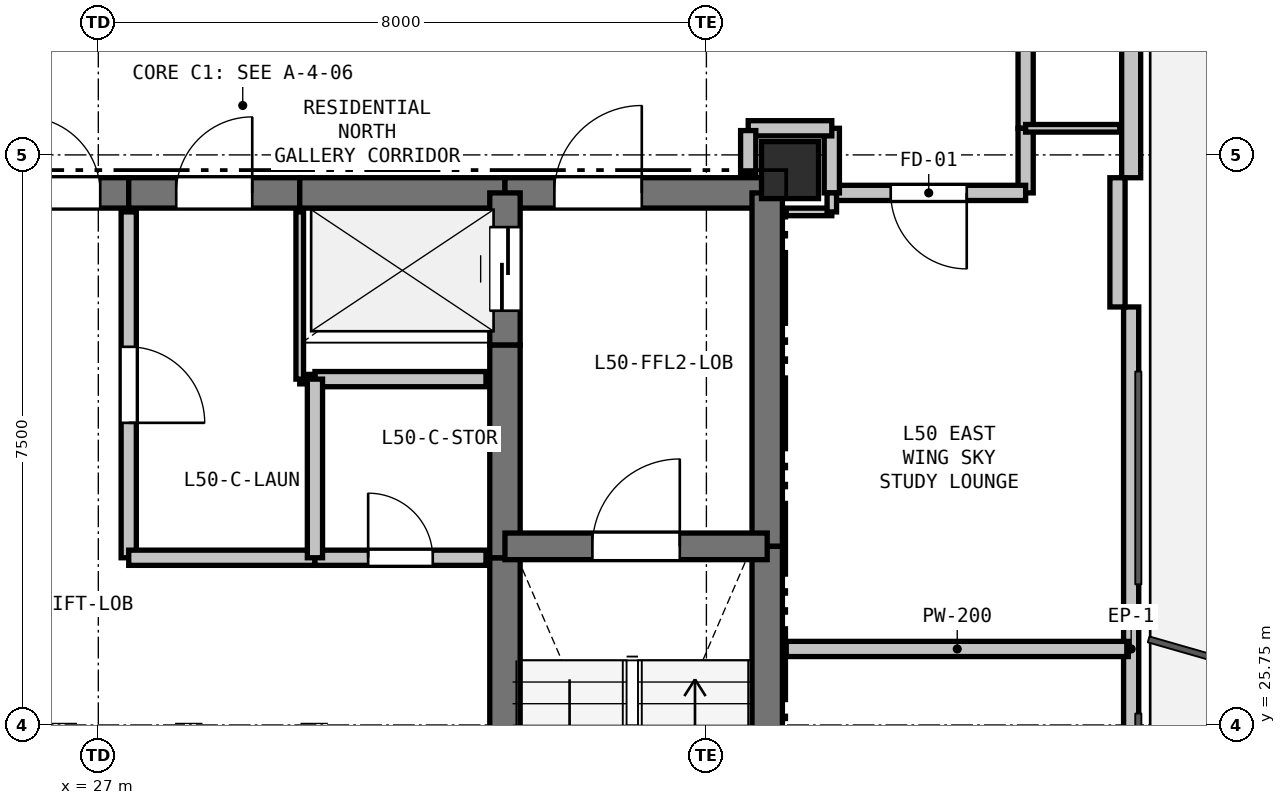
"""IFC4 building model, lengths in metres.
Left out: names, types, materials, properties, quantities, classifications, styles, units other than length and angle.
Written with IfcOpenShell. Run it as: python <this file> out.ifc"""

import sys

from ifc_helpers import new_model, si_unit, direction, frame, frame_2d, origin, origin_2d, place, context, subcontext, project, spatial, rectangle, extrude, element, fill, save


model = new_model("IFC4")
c1 = context("Model", 3, precision=1e-05, world=origin(), true_north=direction((0.0, 1.0)))
c2 = subcontext(c1, "Body", "Model", "MODEL_VIEW")
j1 = project(units=[si_unit("LENGTHUNIT", "METRE"), si_unit("PLANEANGLEUNIT", "RADIAN")], contexts=[c1])
p1 = place(None, origin())
s1 = spatial("IfcSite", under=j1, at=p1, CompositionType="ELEMENT")
p2 = place(p1, origin())
s2 = spatial("IfcBuilding", under=s1, at=p2, CompositionType="ELEMENT")
p3 = place(p2, frame((0.0, 0.0, 182.1)))
s3 = spatial("IfcBuildingStorey", under=s2, at=p3, CompositionType="ELEMENT", Elevation=182.1)
p4 = place(p3, frame((36.1, 33.05, 0.0), z_axis=(0.0, 0.0, 1.0), x_axis=(1.0, 0.0, 0.0)))
e1 = element("IfcColumn", 1, at=p4, inside=s3, PredefinedType="COLUMN", context=c2, shape_type="SweptSolid", body=[
    extrude(rectangle(XDim=0.75, YDim=0.75, at=origin_2d()), origin(), (0.0, 0.0, 1.0), 3.3),
])
p5 = place(p3, frame((19.309, 34.536, 0.0), z_axis=(0.0, 0.0, 1.0), x_axis=(0.866020680503, 0.500008180874, 0.0)))
e2 = element("IfcWall", 2, at=p5, inside=s3, PredefinedType="PARAPET", context=c2, shape_type="SweptSolid", body=[
    extrude(rectangle(XDim=8.999, YDim=0.2, at=frame_2d((4.5, 0.0))), origin(), (0.0, 0.0, 1.0), 0.2),
])
p6 = place(p3, frame((40.588, 42.648, 0.0), z_axis=(0.0, 0.0, 1.0), x_axis=(0.0, -1.0, 0.0)))
e3 = element("IfcWall", 3, at=p6, inside=s3, PredefinedType="SOLIDWALL", context=c2, shape_type="SweptSolid", body=[
    extrude(rectangle(XDim=9.699, YDim=0.25, at=frame_2d((4.85, 0.0))), origin(), (0.0, 0.0, 1.0), 2.69),
])
p7 = place(p6, frame((1.73, 0.0, 0.0)))
e4 = element("IfcOpeningElement", 4, at=p7, cuts=e3, PredefinedType="OPENING", context=c2, shape_type="SweptSolid", body=[
    extrude(rectangle(XDim=1.0, YDim=2.1, at=frame_2d((0.5, 1.05))), frame((0.0, 0.135, 0.0), z_axis=(0.0, -1.0, 0.0), x_axis=(1.0, 0.0, 0.0)), (0.0, 0.0, 1.0), 0.27),
])
p8 = place(p3, frame((40.588, 31.25, 0.0), z_axis=(0.0, 0.0, 1.0), x_axis=(0.0, -1.0, 0.0)))
e5 = element("IfcWall", 5, at=p8, inside=s3, PredefinedType="PARAPET", context=c2, shape_type="SweptSolid", body=[
    extrude(rectangle(XDim=8.999, YDim=0.2, at=frame_2d((4.5, 0.0))), origin(), (0.0, 0.0, 1.0), 0.2),
])
p9 = place(p3, frame((40.408, 32.949, 0.0), z_axis=(0.0, 0.0, 1.0), x_axis=(0.0, -1.0, 0.0)))
e6 = element("IfcWall", 6, at=p9, inside=s3, PredefinedType="PARAPET", context=c2, shape_type="SweptSolid", body=[
    extrude(rectangle(XDim=1.7, YDim=0.2, at=frame_2d((0.85, 0.0))), origin(), (0.0, 0.0, 1.0), 2.69),
])
p10 = place(p3, frame((25.65, 32.75, 0.0), z_axis=(0.0, 0.0, 1.0), x_axis=(1.0, 0.0, 0.0)))
e7 = element("IfcWall", 7, at=p10, inside=s3, PredefinedType="SHEAR", context=c2, shape_type="SweptSolid", body=[
    extrude(rectangle(XDim=1.75, YDim=0.4, at=frame_2d((0.875, 0.0))), origin(), (0.0, 0.0, 1.0), 3.07),
])
p11 = place(p10, frame((0.375, 0.0, 0.0)))
e8 = element("IfcOpeningElement", 8, at=p11, cuts=e7, PredefinedType="OPENING", context=c2, shape_type="SweptSolid", body=[
    extrude(rectangle(XDim=1.0, YDim=2.15, at=frame_2d((0.5, 1.075))), frame((0.0, 0.21, 0.0), z_axis=(0.0, -1.0, 0.0), x_axis=(1.0, 0.0, 0.0)), (0.0, 0.0, 1.0), 0.42),
])
p12 = place(p3, frame((27.4, 32.75, 0.0), z_axis=(0.0, 0.0, 1.0), x_axis=(1.0, 0.0, 0.0)))
e9 = element("IfcWall", 9, at=p12, inside=s3, PredefinedType="SHEAR", context=c2, shape_type="SweptSolid", body=[
    extrude(rectangle(XDim=2.25, YDim=0.4, at=frame_2d((1.125, 0.0))), origin(), (0.0, 0.0, 1.0), 3.07),
])
p13 = place(p12, frame((0.625, 0.0, 0.0)))
e10 = element("IfcOpeningElement", 10, at=p13, cuts=e9, PredefinedType="OPENING", context=c2, shape_type="SweptSolid", body=[
    extrude(rectangle(XDim=1.0, YDim=2.15, at=frame_2d((0.5, 1.075))), frame((0.0, 0.21, 0.0), z_axis=(0.0, -1.0, 0.0), x_axis=(1.0, 0.0, 0.0)), (0.0, 0.0, 1.0), 0.42),
])
p14 = place(p3, frame((29.65, 32.75, 0.0), z_axis=(0.0, 0.0, 1.0), x_axis=(1.0, 0.0, 0.0)))
e11 = element("IfcWall", 11, at=p14, inside=s3, PredefinedType="SHEAR", context=c2, shape_type="SweptSolid", body=[
    extrude(rectangle(XDim=2.7, YDim=0.4, at=frame_2d((1.35, 0.0))), origin(), (0.0, 0.0, 1.0), 3.07),
])
p15 = place(p3, frame((32.35, 32.75, 0.0), z_axis=(0.0, 0.0, 1.0), x_axis=(1.0, 0.0, 0.0)))
e12 = element("IfcWall", 12, at=p15, inside=s3, PredefinedType="SHEAR", context=c2, shape_type="SweptSolid", body=[
    extrude(rectangle(XDim=3.45, YDim=0.4, at=frame_2d((1.725, 0.0))), origin(), (0.0, 0.0, 1.0), 3.07),
])
p16 = place(p15, frame((0.65, 0.0, 0.0)))
e13 = element("IfcOpeningElement", 13, at=p16, cuts=e12, PredefinedType="OPENING", context=c2, shape_type="SweptSolid", body=[
    extrude(rectangle(XDim=1.15, YDim=2.15, at=frame_2d((0.575, 1.075))), frame((0.0, 0.21, 0.0), z_axis=(0.0, -1.0, 0.0), x_axis=(1.0, 0.0, 0.0)), (0.0, 0.0, 1.0), 0.42),
])
p17 = place(p3, frame((35.8, 32.75, 0.0), z_axis=(0.0, 0.0, 1.0), x_axis=(0.0, -1.0, 0.0)))
e14 = element("IfcWall", 14, at=p17, inside=s3, PredefinedType="SHEAR", context=c2, shape_type="SweptSolid", body=[
    extrude(rectangle(XDim=4.65, YDim=0.4, at=frame_2d((2.325, 0.0))), origin(), (0.0, 0.0, 1.0), 3.07),
])
p18 = place(p3, frame((35.8, 28.1, 0.0), z_axis=(0.0, 0.0, 1.0), x_axis=(0.0, -1.0, 0.0)))
e15 = element("IfcWall", 15, at=p18, inside=s3, PredefinedType="SHEAR", context=c2, shape_type="SweptSolid", body=[
    extrude(rectangle(XDim=7.35, YDim=0.4, at=frame_2d((3.675, 0.0))), origin(), (0.0, 0.0, 1.0), 3.07),
])
p19 = place(p3, frame((32.35, 25.55, 0.0), z_axis=(0.0, 0.0, 1.0), x_axis=(0.0, 1.0, 0.0)))
e16 = element("IfcWall", 16, at=p19, inside=s3, PredefinedType="SHEAR", context=c2, shape_type="SweptSolid", body=[
    extrude(rectangle(XDim=2.4, YDim=0.4, at=frame_2d((1.2, 0.0))), origin(), (0.0, 0.0, 1.0), 3.07),
])
p20 = place(p3, frame((32.35, 27.95, 0.0), z_axis=(0.0, 0.0, 1.0), x_axis=(0.0, 1.0, 0.0)))
e17 = element("IfcWall", 17, at=p20, inside=s3, PredefinedType="SHEAR", context=c2, shape_type="SweptSolid", body=[
    extrude(rectangle(XDim=2.8, YDim=0.4, at=frame_2d((1.4, 0.0))), origin(), (0.0, 0.0, 1.0), 3.07),
])
p21 = place(p3, frame((32.35, 30.75, 0.0), z_axis=(0.0, 0.0, 1.0), x_axis=(0.0, 1.0, 0.0)))
e18 = element("IfcWall", 18, at=p21, inside=s3, PredefinedType="SHEAR", context=c2, shape_type="SweptSolid", body=[
    extrude(rectangle(XDim=2.0, YDim=0.4, at=frame_2d((1.0, 0.0))), origin(), (0.0, 0.0, 1.0), 3.07),
])
p22 = place(p21, frame((0.45, 0.0, 0.0)))
e19 = element("IfcOpeningElement", 19, at=p22, cuts=e18, PredefinedType="OPENING", context=c2, shape_type="SweptSolid", body=[
    extrude(rectangle(XDim=1.1, YDim=2.15, at=frame_2d((0.55, 1.075))), frame((0.0, 0.21, 0.0), z_axis=(0.0, -1.0, 0.0), x_axis=(1.0, 0.0, 0.0)), (0.0, 0.0, 1.0), 0.42),
])
p23 = place(p3, frame((32.35, 28.1, 0.0), z_axis=(0.0, 0.0, 1.0), x_axis=(1.0, 0.0, 0.0)))
e20 = element("IfcWall", 20, at=p23, inside=s3, PredefinedType="SHEAR", context=c2, shape_type="SweptSolid", body=[
    extrude(rectangle(XDim=3.45, YDim=0.35, at=frame_2d((1.725, 0.0))), origin(), (0.0, 0.0, 1.0), 3.07),
])
p24 = place(p23, frame((1.15, 0.0, 0.0)))
e21 = element("IfcOpeningElement", 21, at=p24, cuts=e20, PredefinedType="OPENING", context=c2, shape_type="SweptSolid", body=[
    extrude(rectangle(XDim=1.15, YDim=2.15, at=frame_2d((0.575, 1.075))), frame((0.0, 0.185, 0.0), z_axis=(0.0, -1.0, 0.0), x_axis=(1.0, 0.0, 0.0)), (0.0, 0.0, 1.0), 0.37),
])
p25 = place(p3, frame((32.1, 30.3, 0.0), z_axis=(0.0, 0.0, 1.0), x_axis=(-1.0, 0.0, 0.0)))
e22 = element("IfcWall", 22, at=p25, inside=s3, PredefinedType="PARTITIONING", context=c2, shape_type="SweptSolid", body=[
    extrude(rectangle(XDim=2.25, YDim=0.2, at=frame_2d((1.125, 0.0))), origin(), (0.0, 0.0, 1.0), 3.07),
])
p26 = place(p3, frame((29.85, 30.3, 0.0), z_axis=(0.0, 0.0, 1.0), x_axis=(-1.0, 0.0, 0.0)))
e23 = element("IfcWall", 23, at=p26, inside=s3, PredefinedType="PARTITIONING", context=c2, shape_type="SweptSolid", body=[
    extrude(rectangle(XDim=0.2, YDim=0.125, at=frame_2d((0.1, 0.0))), origin(), (0.0, 0.0, 1.0), 3.07),
])
p27 = place(p3, frame((29.65, 30.3, 0.0), z_axis=(0.0, 0.0, 1.0), x_axis=(0.0, 1.0, 0.0)))
e24 = element("IfcWall", 24, at=p27, inside=s3, PredefinedType="PARTITIONING", context=c2, shape_type="SweptSolid", body=[
    extrude(rectangle(XDim=2.2, YDim=0.1, at=frame_2d((1.1, 0.0))), origin(), (0.0, 0.0, 1.0), 3.07),
])
p28 = place(p3, frame((27.4, 32.5, 0.0), z_axis=(0.0, 0.0, 1.0), x_axis=(0.0, -1.0, 0.0)))
e25 = element("IfcWall", 25, at=p28, inside=s3, PredefinedType="PARTITIONING", context=c2, shape_type="SweptSolid", body=[
    extrude(rectangle(XDim=4.55, YDim=0.2, at=frame_2d((2.275, 0.0))), origin(), (0.0, 0.0, 1.0), 3.07),
])
p29 = place(p28, frame((1.775, 0.0, 0.0)))
e26 = element("IfcOpeningElement", 26, at=p29, cuts=e25, PredefinedType="OPENING", context=c2, shape_type="SweptSolid", body=[
    extrude(rectangle(XDim=1.0, YDim=2.15, at=frame_2d((0.5, 1.075))), frame((0.0, 0.11, 0.0), z_axis=(0.0, -1.0, 0.0), x_axis=(1.0, 0.0, 0.0)), (0.0, 0.0, 1.0), 0.22),
])
p30 = place(p3, frame((27.4, 27.95, 0.0), z_axis=(0.0, 0.0, 1.0), x_axis=(1.0, 0.0, 0.0)))
e27 = element("IfcWall", 27, at=p30, inside=s3, PredefinedType="PARTITIONING", context=c2, shape_type="SweptSolid", body=[
    extrude(rectangle(XDim=2.45, YDim=0.2, at=frame_2d((1.225, 0.0))), origin(), (0.0, 0.0, 1.0), 3.07),
])
p31 = place(p3, frame((29.85, 27.95, 0.0), z_axis=(0.0, 0.0, 1.0), x_axis=(1.0, 0.0, 0.0)))
e28 = element("IfcWall", 28, at=p31, inside=s3, PredefinedType="PARTITIONING", context=c2, shape_type="SweptSolid", body=[
    extrude(rectangle(XDim=2.25, YDim=0.2, at=frame_2d((1.125, 0.0))), origin(), (0.0, 0.0, 1.0), 3.07),
])
p32 = place(p31, frame((0.7, 0.0, 0.0)))
e29 = element("IfcOpeningElement", 29, at=p32, cuts=e28, PredefinedType="OPENING", context=c2, shape_type="SweptSolid", body=[
    extrude(rectangle(XDim=0.85, YDim=2.1, at=frame_2d((0.425, 1.05))), frame((0.0, 0.11, 0.0), z_axis=(0.0, -1.0, 0.0), x_axis=(1.0, 0.0, 0.0)), (0.0, 0.0, 1.0), 0.22),
])
p33 = place(p3, frame((39.2, 35.35, 0.0), z_axis=(0.0, 0.0, 1.0), x_axis=(0.0, -1.0, 0.0)))
e30 = element("IfcWall", 30, at=p33, inside=s3, PredefinedType="PARTITIONING", context=c2, shape_type="SweptSolid", body=[
    extrude(rectangle(XDim=1.75, YDim=0.2, at=frame_2d((0.875, 0.0))), origin(), (0.0, 0.0, 1.0), 3.07),
])
p34 = place(p3, frame((39.2, 33.6, 0.0), z_axis=(0.0, 0.0, 1.0), x_axis=(0.0, -1.0, 0.0)))
e31 = element("IfcWall", 31, at=p34, inside=s3, PredefinedType="PARTITIONING", context=c2, shape_type="SweptSolid", body=[
    extrude(rectangle(XDim=0.85, YDim=0.2, at=frame_2d((0.425, 0.0))), origin(), (0.0, 0.0, 1.0), 3.07),
])
p35 = place(p3, frame((39.2, 32.75, 0.0), z_axis=(0.0, 0.0, 1.0), x_axis=(-1.0, 0.0, 0.0)))
e32 = element("IfcWall", 32, at=p35, inside=s3, PredefinedType="PARTITIONING", context=c2, shape_type="SweptSolid", body=[
    extrude(rectangle(XDim=2.55, YDim=0.2, at=frame_2d((1.275, 0.0))), origin(), (0.0, 0.0, 1.0), 3.07),
])
p36 = place(p35, frame((0.775, 0.0, 0.0)))
e33 = element("IfcOpeningElement", 33, at=p36, cuts=e32, PredefinedType="OPENING", context=c2, shape_type="SweptSolid", body=[
    extrude(rectangle(XDim=1.0, YDim=2.15, at=frame_2d((0.5, 1.075))), frame((0.0, 0.11, 0.0), z_axis=(0.0, -1.0, 0.0), x_axis=(1.0, 0.0, 0.0)), (0.0, 0.0, 1.0), 0.22),
])
p37 = place(p3, frame((36.65, 32.75, 0.0), z_axis=(0.0, 0.0, 1.0), x_axis=(0.0, 1.0, 0.0)))
e34 = element("IfcWall", 34, at=p37, inside=s3, PredefinedType="PARTITIONING", context=c2, shape_type="SweptSolid", body=[
    extrude(rectangle(XDim=0.85, YDim=0.2, at=frame_2d((0.425, 0.0))), origin(), (0.0, 0.0, 1.0), 2.518),
])
p38 = place(p3, frame((36.65, 33.6, 0.0), z_axis=(0.0, 0.0, 1.0), x_axis=(-1.0, 0.0, 0.0)))
e35 = element("IfcWall", 35, at=p38, inside=s3, PredefinedType="PARTITIONING", context=c2, shape_type="SweptSolid", body=[
    extrude(rectangle(XDim=1.1, YDim=0.2, at=frame_2d((0.55, 0.0))), origin(), (0.0, 0.0, 1.0), 2.518),
])
p39 = place(p3, frame((35.55, 33.57, 0.0), z_axis=(0.0, 0.0, 1.0), x_axis=(0.0, -1.0, 0.0)))
e36 = element("IfcWall", 36, at=p39, inside=s3, PredefinedType="PARTITIONING", context=c2, shape_type="SweptSolid", body=[
    extrude(rectangle(XDim=0.57, YDim=0.2, at=frame_2d((0.285, 0.0))), origin(), (0.0, 0.0, 1.0), 2.595),
])
p40 = place(p3, frame((29.85, 30.3, 0.0), z_axis=(0.0, 0.0, 1.0), x_axis=(0.0, -1.0, 0.0)))
e37 = element("IfcWall", 37, at=p40, inside=s3, PredefinedType="PARTITIONING", context=c2, shape_type="SweptSolid", body=[
    extrude(rectangle(XDim=2.35, YDim=0.2, at=frame_2d((1.175, 0.0))), origin(), (0.0, 0.0, 1.0), 3.07),
])
p41 = place(p3, frame((36.05, 32.5, 0.0), z_axis=(0.0, 0.0, 1.0), x_axis=(1.0, 0.0, 0.0)))
e38 = element("IfcWall", 38, at=p41, inside=s3, PredefinedType="PARTITIONING", context=c2, shape_type="SweptSolid", body=[
    extrude(rectangle(XDim=0.6, YDim=0.1, at=frame_2d((0.3, 0.0))), origin(), (0.0, 0.0, 1.0), 2.595),
])
p42 = place(p3, frame((36.65, 32.5, 0.0), z_axis=(0.0, 0.0, 1.0), x_axis=(0.0, 1.0, 0.0)))
e39 = element("IfcWall", 39, at=p42, inside=s3, PredefinedType="PARTITIONING", context=c2, shape_type="SweptSolid", body=[
    extrude(rectangle(XDim=0.25, YDim=0.125, at=frame_2d((0.125, 0.0))), origin(), (0.0, 0.0, 1.0), 3.07),
])
p43 = place(p3, frame((39.2, 33.6, 0.0), z_axis=(0.0, 0.0, 1.0), x_axis=(1.0, 0.0, 0.0)))
e40 = element("IfcWall", 40, at=p43, inside=s3, PredefinedType="PARTITIONING", context=c2, shape_type="SweptSolid", body=[
    extrude(rectangle(XDim=1.24, YDim=0.1, at=frame_2d((0.62, 0.0))), origin(), (0.0, 0.0, 1.0), 2.365),
])
p44 = place(p3, frame((40.55, 26.75, 0.0), z_axis=(0.0, 0.0, 1.0), x_axis=(-1.0, 0.0, 0.0)))
e41 = element("IfcWall", 41, at=p44, inside=s3, PredefinedType="PARTITIONING", context=c2, shape_type="SweptSolid", body=[
    extrude(rectangle(XDim=4.5, YDim=0.2, at=frame_2d((2.25, 0.0))), origin(), (0.0, 0.0, 1.0), 2.365),
])
p45 = place(p11, origin())
e42 = element("IfcDoor", 42, at=p45, inside=s3, OperationType="SINGLE_SWING_LEFT", PredefinedType="DOOR", context=c2, shape_type="SweptSolid", body=[
    extrude(rectangle(XDim=1.0, YDim=2.15, at=frame_2d((0.5, 1.075))), frame((0.0, 0.025, 0.0), z_axis=(0.0, -1.0, 0.0), x_axis=(1.0, 0.0, 0.0)), (0.0, 0.0, 1.0), 0.05),
])
fill(e8, e42)
p46 = place(p22, origin())
e43 = element("IfcDoor", 43, at=p46, inside=s3, OperationType="SLIDING_TO_LEFT", PredefinedType="DOOR", context=c2, shape_type="SweptSolid", body=[
    extrude(rectangle(XDim=1.1, YDim=2.15, at=frame_2d((0.55, 1.075))), frame((0.0, 0.025, 0.0), z_axis=(0.0, -1.0, 0.0), x_axis=(1.0, 0.0, 0.0)), (0.0, 0.0, 1.0), 0.05),
])
fill(e19, e43)
p47 = place(p24, origin())
e44 = element("IfcDoor", 44, at=p47, inside=s3, OperationType="SINGLE_SWING_RIGHT", PredefinedType="DOOR", context=c2, shape_type="SweptSolid", body=[
    extrude(rectangle(XDim=1.15, YDim=2.15, at=frame_2d((0.575, 1.075))), frame((0.0, 0.025, 0.0), z_axis=(0.0, -1.0, 0.0), x_axis=(1.0, 0.0, 0.0)), (0.0, 0.0, 1.0), 0.05),
])
fill(e21, e44)
p48 = place(p16, origin())
e45 = element("IfcDoor", 45, at=p48, inside=s3, OperationType="SINGLE_SWING_RIGHT", PredefinedType="DOOR", context=c2, shape_type="SweptSolid", body=[
    extrude(rectangle(XDim=1.15, YDim=2.15, at=frame_2d((0.575, 1.075))), frame((0.0, 0.025, 0.0), z_axis=(0.0, -1.0, 0.0), x_axis=(1.0, 0.0, 0.0)), (0.0, 0.0, 1.0), 0.05),
])
fill(e13, e45)
p49 = place(p29, origin())
e46 = element("IfcDoor", 46, at=p49, inside=s3, OperationType="SINGLE_SWING_RIGHT", PredefinedType="DOOR", context=c2, shape_type="SweptSolid", body=[
    extrude(rectangle(XDim=1.0, YDim=2.15, at=frame_2d((0.5, 1.075))), frame((0.0, 0.025, 0.0), z_axis=(0.0, -1.0, 0.0), x_axis=(1.0, 0.0, 0.0)), (0.0, 0.0, 1.0), 0.05),
])
fill(e26, e46)
p50 = place(p32, origin())
e47 = element("IfcDoor", 47, at=p50, inside=s3, OperationType="SINGLE_SWING_LEFT", PredefinedType="DOOR", context=c2, shape_type="SweptSolid", body=[
    extrude(rectangle(XDim=0.85, YDim=2.1, at=frame_2d((0.425, 1.05))), frame((0.0, 0.025, 0.0), z_axis=(0.0, -1.0, 0.0), x_axis=(1.0, 0.0, 0.0)), (0.0, 0.0, 1.0), 0.05),
])
fill(e29, e47)
p51 = place(p13, origin())
e48 = element("IfcDoor", 48, at=p51, inside=s3, OperationType="SINGLE_SWING_RIGHT", PredefinedType="DOOR", context=c2, shape_type="SweptSolid", body=[
    extrude(rectangle(XDim=1.0, YDim=2.15, at=frame_2d((0.5, 1.075))), frame((0.0, 0.025, 0.0), z_axis=(0.0, -1.0, 0.0), x_axis=(1.0, 0.0, 0.0)), (0.0, 0.0, 1.0), 0.05),
])
fill(e10, e48)
p52 = place(p36, origin())
e49 = element("IfcDoor", 49, at=p52, inside=s3, OperationType="SINGLE_SWING_LEFT", PredefinedType="DOOR", context=c2, shape_type="SweptSolid", body=[
    extrude(rectangle(XDim=1.0, YDim=2.15, at=frame_2d((0.5, 1.075))), frame((0.0, 0.025, 0.0), z_axis=(0.0, -1.0, 0.0), x_axis=(1.0, 0.0, 0.0)), (0.0, 0.0, 1.0), 0.05),
])
fill(e33, e49)
save(model, sys.argv[1])
